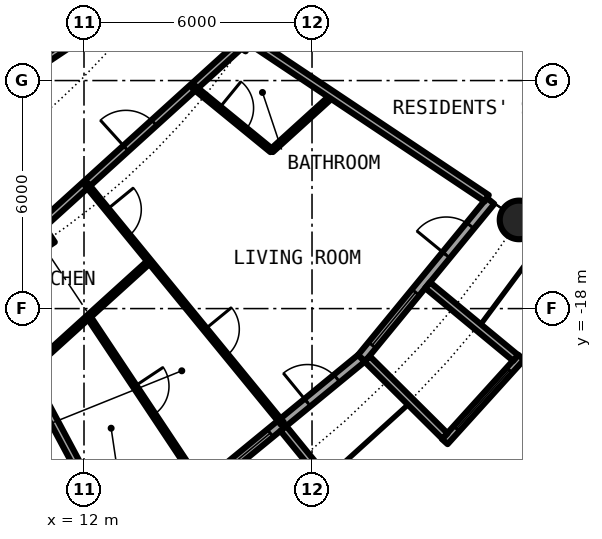
"""IFC4 building model, lengths in metres.
Left out: names, types, materials, properties, quantities, classifications, styles, units other than length and angle.
Written with IfcOpenShell. Run it as: python <this file> out.ifc"""

import sys

from ifc_helpers import new_model, si_unit, direction, frame, frame_2d, origin, origin_2d, place, context, subcontext, project, spatial, rectangle, circle, hollow_circle, i_section, extrude, element, fill, save


model = new_model("IFC4")
c1 = context("Model", 3, precision=1e-05, world=origin(), true_north=direction((0.0, 1.0)))
c2 = subcontext(c1, "Body", "Model", "MODEL_VIEW")
j1 = project(units=[si_unit("LENGTHUNIT", "METRE"), si_unit("PLANEANGLEUNIT", "RADIAN")], contexts=[c1])
p1 = place(None, origin())
s1 = spatial("IfcSite", under=j1, at=p1, CompositionType="ELEMENT")
p2 = place(p1, origin())
s2 = spatial("IfcBuilding", under=s1, at=p2, CompositionType="ELEMENT")
p3 = place(p2, frame((0.0, 0.0, 28.9)))
s3 = spatial("IfcBuildingStorey", under=s2, at=p3, CompositionType="ELEMENT", Elevation=28.9)
p4 = place(p3, frame((23.448, -15.667, 0.0), z_axis=(0.0, 0.0, 1.0), x_axis=(1.0, 0.0, 0.0)))
e1 = element("IfcColumn", 1, at=p4, inside=s3, PredefinedType="COLUMN", context=c2, shape_type="SweptSolid", body=[
    extrude(hollow_circle(Radius=0.508, WallThickness=0.05, at=origin_2d()), origin(), (0.0, 0.0, 1.0), 3.05),
])
p5 = place(p3, frame((10.889, -16.297, 0.0), z_axis=(0.0, 0.0, 1.0), x_axis=(0.55557023302, -0.831469612303, 0.0)))
e2 = element("IfcColumn", 2, at=p5, inside=s3, PredefinedType="COLUMN", context=c2, shape_type="SweptSolid", body=[
    extrude(i_section(OverallWidth=0.305, OverallDepth=0.62, WebThickness=0.021, FlangeThickness=0.04, FilletRadius=0.027, at=origin_2d()), origin(), (0.0, 0.0, 1.0), 3.05),
])
p6 = place(p3, frame((15.167, -22.699, 0.0), z_axis=(0.0, 0.0, 1.0), x_axis=(0.773019449054, 0.634382322723, 0.0)))
e3 = element("IfcWall", 3, at=p6, inside=s3, PredefinedType="SOLIDWALL", context=c2, shape_type="SweptSolid", body=[
    extrude(rectangle(XDim=5.352, YDim=0.25, at=frame_2d((2.676, 0.0))), origin(), (0.0, 0.0, 1.0), 2.7),
])
p7 = place(p6, frame((0.441, 0.0, 0.3)))
e4 = element("IfcOpeningElement", 4, at=p7, cuts=e3, PredefinedType="OPENING", context=c2, shape_type="SweptSolid", body=[
    extrude(rectangle(XDim=1.8, YDim=2.1, at=frame_2d((0.9, 1.05))), frame((0.0, 0.135, 0.0), z_axis=(0.0, -1.0, 0.0), x_axis=(1.0, 0.0, 0.0)), (0.0, 0.0, 1.0), 0.27),
])
p8 = place(p6, frame((3.51, 0.0, 0.0)))
e5 = element("IfcOpeningElement", 5, at=p8, cuts=e3, PredefinedType="OPENING", context=c2, shape_type="SweptSolid", body=[
    extrude(rectangle(XDim=1.0, YDim=2.2, at=frame_2d((0.5, 1.1))), frame((0.0, 0.135, 0.0), z_axis=(0.0, -1.0, 0.0), x_axis=(1.0, 0.0, 0.0)), (0.0, 0.0, 1.0), 0.27),
])
p9 = place(p3, frame((17.246, -21.155, -0.03), z_axis=(0.0, 0.0, 1.0), x_axis=(0.631741648902, -0.775179004516, 0.0)))
e6 = element("IfcWall", 6, at=p9, inside=s3, PredefinedType="SOLIDWALL", context=c2, shape_type="SweptSolid", body=[
    extrude(rectangle(XDim=3.006, YDim=0.2, at=frame_2d((1.503, 0.0))), origin(), (0.0, 0.0, 1.0), 2.73),
])
p10 = place(p3, frame((19.304, -19.304, 0.0), z_axis=(0.0, 0.0, 1.0), x_axis=(0.634382322723, 0.773019449054, 0.0)))
e7 = element("IfcWall", 7, at=p10, inside=s3, PredefinedType="SOLIDWALL", context=c2, shape_type="SweptSolid", body=[
    extrude(rectangle(XDim=5.352, YDim=0.25, at=frame_2d((2.676, 0.0))), origin(), (0.0, 0.0, 1.0), 2.7),
])
p11 = place(p10, frame((0.441, 0.0, 0.3)))
e8 = element("IfcOpeningElement", 8, at=p11, cuts=e7, PredefinedType="OPENING", context=c2, shape_type="SweptSolid", body=[
    extrude(rectangle(XDim=1.8, YDim=2.1, at=frame_2d((0.9, 1.05))), frame((0.0, 0.135, 0.0), z_axis=(0.0, -1.0, 0.0), x_axis=(1.0, 0.0, 0.0)), (0.0, 0.0, 1.0), 0.27),
])
p12 = place(p10, frame((3.51, 0.0, 0.0)))
e9 = element("IfcOpeningElement", 9, at=p12, cuts=e7, PredefinedType="OPENING", context=c2, shape_type="SweptSolid", body=[
    extrude(rectangle(XDim=1.0, YDim=2.2, at=frame_2d((0.5, 1.1))), frame((0.0, 0.135, 0.0), z_axis=(0.0, -1.0, 0.0), x_axis=(1.0, 0.0, 0.0)), (0.0, 0.0, 1.0), 0.27),
])
p13 = place(p3, frame((21.493, -21.5, -0.03), z_axis=(0.0, 0.0, 1.0), x_axis=(0.671506829416, 0.740998365753, 0.0)))
e10 = element("IfcWall", 10, at=p13, inside=s3, PredefinedType="SOLIDWALL", context=c2, shape_type="SweptSolid", body=[
    extrude(rectangle(XDim=2.993, YDim=0.2, at=frame_2d((1.497, 0.0))), origin(), (0.0, 0.0, 1.0), 2.73),
])
p14 = place(p13, frame((0.457, 0.0, 0.33)))
e11 = element("IfcOpeningElement", 11, at=p14, cuts=e10, PredefinedType="OPENING", context=c2, shape_type="SweptSolid", body=[
    extrude(circle(Radius=1.04, at=frame_2d((1.04, 1.04))), frame((0.0, 0.11, 0.0), z_axis=(0.0, -1.0, 0.0), x_axis=(1.0, 0.0, 0.0)), (0.0, 0.0, 1.0), 0.22),
])
p15 = place(p3, frame((19.45, -19.323, -0.03), z_axis=(0.0, 0.0, 1.0), x_axis=(0.709727076896, -0.704476739375, 0.0)))
e12 = element("IfcWall", 12, at=p15, inside=s3, PredefinedType="SOLIDWALL", context=c2, shape_type="SweptSolid", body=[
    extrude(rectangle(XDim=2.883, YDim=0.2, at=frame_2d((1.441, 0.0))), origin(), (0.0, 0.0, 1.0), 2.73),
])
p16 = place(p3, frame((21.041, -17.384, -0.03), z_axis=(0.0, 0.0, 1.0), x_axis=(0.770784861449, -0.63709551667, 0.0)))
e13 = element("IfcWall", 13, at=p16, inside=s3, PredefinedType="SOLIDWALL", context=c2, shape_type="SweptSolid", body=[
    extrude(rectangle(XDim=3.006, YDim=0.2, at=frame_2d((1.503, 0.0))), origin(), (0.0, 0.0, 1.0), 2.73),
])
p17 = place(p3, frame((10.513, -19.668, 0.0), z_axis=(0.0, 0.0, 1.0), x_axis=(0.74092137325, 0.671591779775, 0.0)))
e14 = element("IfcWall", 14, at=p17, inside=s3, PredefinedType="PARTITIONING", context=c2, shape_type="SweptSolid", body=[
    extrude(rectangle(XDim=4.342, YDim=0.1, at=frame_2d((2.171, 0.0))), origin(), (0.0, 0.0, 1.0), 2.7),
])
p18 = place(p3, frame((16.936, -13.845, 0.0), z_axis=(0.0, 0.0, 1.0), x_axis=(0.740836325503, 0.671685595212, 0.0)))
e15 = element("IfcWall", 15, at=p18, inside=s3, PredefinedType="PARTITIONING", context=c2, shape_type="SweptSolid", body=[
    extrude(rectangle(XDim=2.168, YDim=0.1, at=frame_2d((1.084, 0.0))), origin(), (0.0, 0.0, 1.0), 2.7),
])
p19 = place(p3, frame((9.239, -17.286, 0.0), z_axis=(0.0, 0.0, 1.0), x_axis=(0.74089212117, 0.671624050186, 0.0)))
e16 = element("IfcWall", 16, at=p19, inside=s3, PredefinedType="PARTITIONING", context=c2, shape_type="SweptSolid", body=[
    extrude(rectangle(XDim=9.368, YDim=0.2, at=frame_2d((4.684, 0.0))), origin(), (0.0, 0.0, 1.0), 2.38),
])
p20 = place(p19, frame((5.215, 0.0, 0.0)))
e17 = element("IfcOpeningElement", 17, at=p20, cuts=e16, PredefinedType="OPENING", context=c2, shape_type="SweptSolid", body=[
    extrude(rectangle(XDim=1.0, YDim=2.3, at=frame_2d((0.5, 1.15))), frame((0.0, 0.11, 0.0), z_axis=(0.0, -1.0, 0.0), x_axis=(1.0, 0.0, 0.0)), (0.0, 0.0, 1.0), 0.22),
])
p21 = place(p3, frame((3.297, -16.575, 0.0), z_axis=(0.0, 0.0, 1.0), x_axis=(0.831561346449, 0.555432918625, 0.0)))
e18 = element("IfcWall", 18, at=p21, inside=s3, PredefinedType="PARTITIONING", context=c2, shape_type="SweptSolid", body=[
    extrude(rectangle(XDim=12.914, YDim=0.2, at=frame_2d((6.457, 0.0))), origin(), (0.0, 0.0, 1.0), 2.7),
])
p22 = place(p21, frame((4.352, 0.0, 0.0)))
e19 = element("IfcOpeningElement", 19, at=p22, cuts=e18, PredefinedType="OPENING", context=c2, shape_type="SweptSolid", body=[
    extrude(rectangle(XDim=1.0, YDim=2.3, at=frame_2d((0.5, 1.15))), frame((0.0, 0.11, 0.0), z_axis=(0.0, -1.0, 0.0), x_axis=(1.0, 0.0, 0.0)), (0.0, 0.0, 1.0), 0.22),
])
p23 = place(p3, frame((9.239, -17.286, 0.0), z_axis=(0.0, 0.0, 1.0), x_axis=(0.471439510802, -0.881898399848, 0.0)))
e20 = element("IfcWall", 20, at=p23, inside=s3, PredefinedType="PARTITIONING", context=c2, shape_type="SweptSolid", body=[
    extrude(rectangle(XDim=7.575, YDim=0.2, at=frame_2d((3.787, 0.0))), origin(), (0.0, 0.0, 1.0), 2.7),
])
p24 = place(p3, frame((12.062, -14.727, 0.0), z_axis=(0.0, 0.0, 1.0), x_axis=(0.633664062855, -0.773608334654, 0.0)))
e21 = element("IfcWall", 21, at=p24, inside=s3, PredefinedType="PARTITIONING", context=c2, shape_type="SweptSolid", body=[
    extrude(rectangle(XDim=8.138, YDim=0.1, at=frame_2d((4.069, 0.0))), origin(), (0.0, 0.0, 1.0), 2.7),
])
p25 = place(p24, frame((0.861, 0.0, 0.0)))
e22 = element("IfcOpeningElement", 22, at=p25, cuts=e21, PredefinedType="OPENING", context=c2, shape_type="SweptSolid", body=[
    extrude(rectangle(XDim=0.9, YDim=2.3, at=frame_2d((0.45, 1.15))), frame((0.0, 0.06, 0.0), z_axis=(0.0, -1.0, 0.0), x_axis=(1.0, 0.0, 0.0)), (0.0, 0.0, 1.0), 0.12),
])
p26 = place(p24, frame((4.931, 0.0, 0.0)))
e23 = element("IfcOpeningElement", 23, at=p26, cuts=e21, PredefinedType="OPENING", context=c2, shape_type="SweptSolid", body=[
    extrude(rectangle(XDim=0.9, YDim=2.3, at=frame_2d((0.45, 1.15))), frame((0.0, 0.06, 0.0), z_axis=(0.0, -1.0, 0.0), x_axis=(1.0, 0.0, 0.0)), (0.0, 0.0, 1.0), 0.12),
])
p27 = place(p3, frame((12.118, -18.211, 0.0), z_axis=(0.0, 0.0, 1.0), x_axis=(0.553913391217, -0.832574294, 0.0)))
e24 = element("IfcWall", 24, at=p27, inside=s3, PredefinedType="PARTITIONING", context=c2, shape_type="SweptSolid", body=[
    extrude(rectangle(XDim=5.301, YDim=0.1, at=frame_2d((2.65, 0.0))), origin(), (0.0, 0.0, 1.0), 2.7),
])
p28 = place(p27, frame((2.2, 0.0, 0.0)))
e25 = element("IfcOpeningElement", 25, at=p28, cuts=e24, PredefinedType="OPENING", context=c2, shape_type="SweptSolid", body=[
    extrude(rectangle(XDim=0.9, YDim=2.3, at=frame_2d((0.45, 1.15))), frame((0.0, 0.06, 0.0), z_axis=(0.0, -1.0, 0.0), x_axis=(1.0, 0.0, 0.0)), (0.0, 0.0, 1.0), 0.12),
])
p29 = place(p3, frame((14.885, -12.168, 0.0), z_axis=(0.0, 0.0, 1.0), x_axis=(0.774162545943, -0.632986850147, 0.0)))
e26 = element("IfcWall", 26, at=p29, inside=s3, PredefinedType="PARTITIONING", context=c2, shape_type="SweptSolid", body=[
    extrude(rectangle(XDim=2.649, YDim=0.1, at=frame_2d((1.325, 0.0))), origin(), (0.0, 0.0, 1.0), 2.7),
])
p30 = place(p29, frame((0.875, 0.0, 0.0)))
e27 = element("IfcOpeningElement", 27, at=p30, cuts=e26, PredefinedType="OPENING", context=c2, shape_type="SweptSolid", body=[
    extrude(rectangle(XDim=0.9, YDim=2.3, at=frame_2d((0.45, 1.15))), frame((0.0, 0.06, 0.0), z_axis=(0.0, -1.0, 0.0), x_axis=(1.0, 0.0, 0.0)), (0.0, 0.0, 1.0), 0.12),
])
p31 = place(p3, frame((16.555, -11.061, 0.0), z_axis=(0.0, 0.0, 1.0), x_axis=(0.831507055747, -0.555514190857, 0.0)))
e28 = element("IfcWall", 28, at=p31, inside=s3, PredefinedType="PARTITIONING", context=c2, shape_type="SweptSolid", body=[
    extrude(rectangle(XDim=7.265, YDim=0.2, at=frame_2d((3.633, 0.0))), origin(), (0.0, 0.0, 1.0), 2.7),
])
p32 = place(p7, origin())
e29 = element("IfcWindow", 29, at=p32, inside=s3, PartitioningType="SINGLE_PANEL", PredefinedType="WINDOW", context=c2, shape_type="SweptSolid", body=[
    extrude(rectangle(XDim=1.8, YDim=2.1, at=frame_2d((0.9, 1.05))), frame((0.0, 0.03, 0.0), z_axis=(0.0, -1.0, 0.0), x_axis=(1.0, 0.0, 0.0)), (0.0, 0.0, 1.0), 0.06),
])
fill(e4, e29)
p33 = place(p8, origin())
e30 = element("IfcDoor", 30, at=p33, inside=s3, OperationType="SINGLE_SWING_LEFT", PredefinedType="DOOR", context=c2, shape_type="SweptSolid", body=[
    extrude(rectangle(XDim=1.0, YDim=2.2, at=frame_2d((0.5, 1.1))), frame((0.0, 0.025, 0.0), z_axis=(0.0, -1.0, 0.0), x_axis=(1.0, 0.0, 0.0)), (0.0, 0.0, 1.0), 0.05),
])
fill(e5, e30)
p34 = place(p11, origin())
e31 = element("IfcWindow", 31, at=p34, inside=s3, PartitioningType="SINGLE_PANEL", PredefinedType="WINDOW", context=c2, shape_type="SweptSolid", body=[
    extrude(rectangle(XDim=1.8, YDim=2.1, at=frame_2d((0.9, 1.05))), frame((0.0, 0.03, 0.0), z_axis=(0.0, -1.0, 0.0), x_axis=(1.0, 0.0, 0.0)), (0.0, 0.0, 1.0), 0.06),
])
fill(e8, e31)
p35 = place(p14, origin())
e32 = element("IfcWindow", 32, at=p35, inside=s3, PartitioningType="SINGLE_PANEL", PredefinedType="WINDOW", context=c2, shape_type="SweptSolid", body=[
    extrude(circle(Radius=1.04, at=frame_2d((1.04, 1.04))), frame((0.0, 0.03, 0.0), z_axis=(0.0, -1.0, 0.0), x_axis=(1.0, 0.0, 0.0)), (0.0, 0.0, 1.0), 0.06),
])
fill(e11, e32)
p36 = place(p12, origin())
e33 = element("IfcDoor", 33, at=p36, inside=s3, OperationType="SINGLE_SWING_LEFT", PredefinedType="DOOR", context=c2, shape_type="SweptSolid", body=[
    extrude(rectangle(XDim=1.0, YDim=2.2, at=frame_2d((0.5, 1.1))), frame((0.0, 0.025, 0.0), z_axis=(0.0, -1.0, 0.0), x_axis=(1.0, 0.0, 0.0)), (0.0, 0.0, 1.0), 0.05),
])
fill(e9, e33)
p37 = place(p20, origin())
e34 = element("IfcDoor", 34, at=p37, inside=s3, OperationType="SINGLE_SWING_RIGHT", PredefinedType="DOOR", context=c2, shape_type="SweptSolid", body=[
    extrude(rectangle(XDim=1.0, YDim=2.3, at=frame_2d((0.5, 1.15))), frame((0.0, 0.025, 0.0), z_axis=(0.0, -1.0, 0.0), x_axis=(1.0, 0.0, 0.0)), (0.0, 0.0, 1.0), 0.05),
])
fill(e17, e34)
p38 = place(p30, origin())
e35 = element("IfcDoor", 35, at=p38, inside=s3, OperationType="SINGLE_SWING_RIGHT", PredefinedType="DOOR", context=c2, shape_type="SweptSolid", body=[
    extrude(rectangle(XDim=0.9, YDim=2.3, at=frame_2d((0.45, 1.15))), frame((0.0, 0.025, 0.0), z_axis=(0.0, -1.0, 0.0), x_axis=(1.0, 0.0, 0.0)), (0.0, 0.0, 1.0), 0.05),
])
fill(e27, e35)
p39 = place(p25, origin())
e36 = element("IfcDoor", 36, at=p39, inside=s3, OperationType="SINGLE_SWING_LEFT", PredefinedType="DOOR", context=c2, shape_type="SweptSolid", body=[
    extrude(rectangle(XDim=0.9, YDim=2.3, at=frame_2d((0.45, 1.15))), frame((0.0, 0.025, 0.0), z_axis=(0.0, -1.0, 0.0), x_axis=(1.0, 0.0, 0.0)), (0.0, 0.0, 1.0), 0.05),
])
fill(e22, e36)
p40 = place(p26, origin())
e37 = element("IfcDoor", 37, at=p40, inside=s3, OperationType="SINGLE_SWING_RIGHT", PredefinedType="DOOR", context=c2, shape_type="SweptSolid", body=[
    extrude(rectangle(XDim=0.9, YDim=2.3, at=frame_2d((0.45, 1.15))), frame((0.0, 0.025, 0.0), z_axis=(0.0, -1.0, 0.0), x_axis=(1.0, 0.0, 0.0)), (0.0, 0.0, 1.0), 0.05),
])
fill(e23, e37)
p41 = place(p28, origin())
e38 = element("IfcDoor", 38, at=p41, inside=s3, OperationType="SINGLE_SWING_RIGHT", PredefinedType="DOOR", context=c2, shape_type="SweptSolid", body=[
    extrude(rectangle(XDim=0.9, YDim=2.3, at=frame_2d((0.45, 1.15))), frame((0.0, 0.025, 0.0), z_axis=(0.0, -1.0, 0.0), x_axis=(1.0, 0.0, 0.0)), (0.0, 0.0, 1.0), 0.05),
])
fill(e25, e38)
save(model, sys.argv[1])
